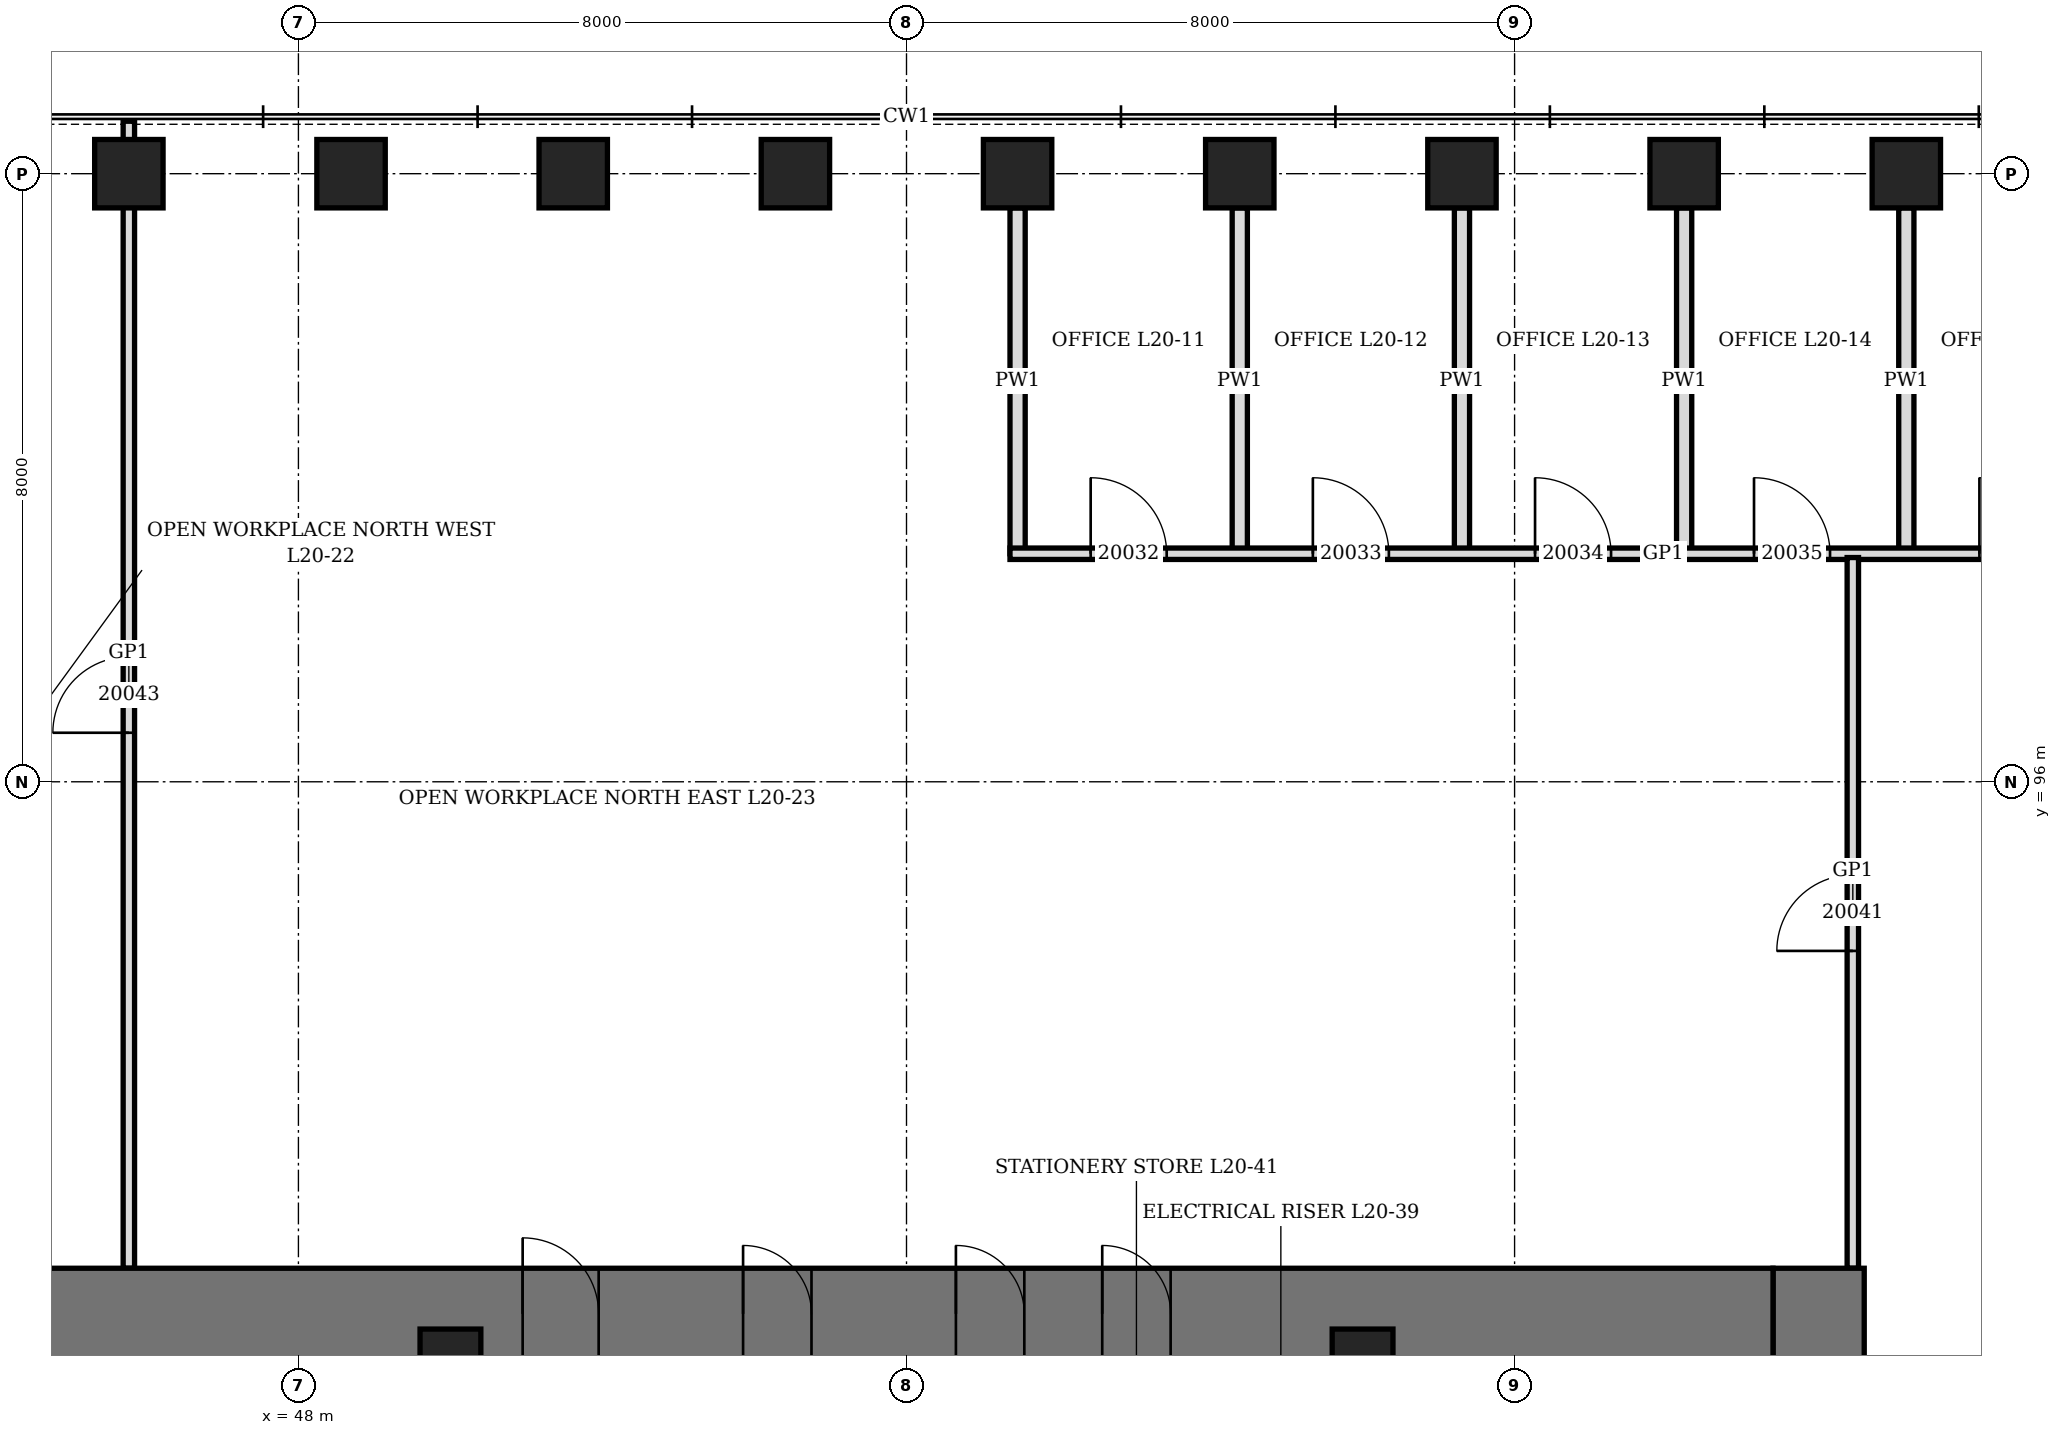
"""IFC4 building model, lengths in metres.
Left out: names, types, materials, properties, quantities, classifications, styles, units other than length and angle.
Written with IfcOpenShell. Run it as: python <this file> out.ifc"""

import sys

from ifc_helpers import new_model, si_unit, direction, frame, frame_2d, origin, origin_2d, place, context, subcontext, project, spatial, rectangle, hollow_rectangle, extrude, element, fill, save


model = new_model("IFC4")
c1 = context("Model", 3, precision=1e-05, world=origin(), true_north=direction((0.0, 1.0)))
c2 = subcontext(c1, "Body", "Model", "MODEL_VIEW")
j1 = project(units=[si_unit("LENGTHUNIT", "METRE"), si_unit("PLANEANGLEUNIT", "RADIAN")], contexts=[c1])
p1 = place(None, origin())
s1 = spatial("IfcSite", under=j1, at=p1, CompositionType="ELEMENT")
p2 = place(p1, origin())
s2 = spatial("IfcBuilding", under=s1, at=p2, CompositionType="ELEMENT")
p3 = place(p2, frame((0.0, 0.0, 93.7)))
s3 = spatial("IfcBuildingStorey", under=s2, at=p3, CompositionType="ELEMENT", Elevation=93.7)
for number, where, z_axis, x_axis in (
    (1, (69.154, 104.0, 0.0), (0.0, 0.0, 1.0), (1.0, 0.0, 0.0)),
    (2, (66.231, 104.0, 0.0), (0.0, 0.0, 1.0), (1.0, 0.0, 0.0)),
    (3, (63.308, 104.0, 0.0), (0.0, 0.0, 1.0), (1.0, 0.0, 0.0)),
    (4, (60.385, 104.0, 0.0), (0.0, 0.0, 1.0), (1.0, 0.0, 0.0)),
    (5, (57.461, 104.0, 0.0), (0.0, 0.0, 1.0), (1.0, 0.0, 0.0)),
    (6, (54.539, 104.0, 0.0), (0.0, 0.0, 1.0), (1.0, 0.0, 0.0)),
    (7, (51.615, 104.0, 0.0), (0.0, 0.0, 1.0), (1.0, 0.0, 0.0)),
    (8, (48.692, 104.0, 0.0), (0.0, 0.0, 1.0), (1.0, 0.0, 0.0)),
    (9, (45.769, 104.0, 0.0), (0.0, 0.0, 1.0), (1.0, 0.0, 0.0)),
):
    element("IfcColumn", number, at=place(p3, frame(where, z_axis=z_axis, x_axis=x_axis)), inside=s3, PredefinedType="COLUMN", context=c2, shape_type="SweptSolid", body=[
        extrude(hollow_rectangle(XDim=0.9, YDim=0.9, WallThickness=0.12, at=origin_2d()), origin(), (0.0, 0.0, 1.0), 4.2),
    ])
p4 = place(p3, frame((68.0, 70.4, 0.0), z_axis=(0.0, 0.0, 1.0), x_axis=(0.0, 1.0, 0.0)))
e10 = element("IfcWall", 10, at=p4, inside=s3, PredefinedType="SHEAR", context=c2, shape_type="SweptSolid", body=[
    extrude(rectangle(XDim=19.2, YDim=1.2, at=frame_2d((9.6, 0.0))), origin(), (0.0, 0.0, 1.0), 4.2),
])
p5 = place(p4, frame((8.6, 0.0, 0.0)))
e11 = element("IfcOpeningElement", 11, at=p5, cuts=e10, PredefinedType="OPENING", context=c2, shape_type="SweptSolid", body=[
    extrude(rectangle(XDim=2.0, YDim=2.4, at=frame_2d((1.0, 1.2))), frame((0.0, 0.61, 0.0), z_axis=(0.0, -1.0, 0.0), x_axis=(1.0, 0.0, 0.0)), (0.0, 0.0, 1.0), 1.22),
])
p6 = place(p3, frame((44.6, 89.0, 0.0), z_axis=(0.0, 0.0, 1.0), x_axis=(1.0, 0.0, 0.0)))
e12 = element("IfcWall", 12, at=p6, inside=s3, PredefinedType="SHEAR", context=c2, shape_type="SweptSolid", body=[
    extrude(rectangle(XDim=22.8, YDim=1.2, at=frame_2d((11.4, 0.0))), origin(), (0.0, 0.0, 1.0), 4.2),
])
p7 = place(p6, frame((6.35, 0.0, 0.0)))
e13 = element("IfcOpeningElement", 13, at=p7, cuts=e12, PredefinedType="OPENING", context=c2, shape_type="SweptSolid", body=[
    extrude(rectangle(XDim=1.0, YDim=2.1, at=frame_2d((0.5, 1.05))), frame((0.0, 0.61, 0.0), z_axis=(0.0, -1.0, 0.0), x_axis=(1.0, 0.0, 0.0)), (0.0, 0.0, 1.0), 1.22),
])
p8 = place(p6, frame((9.25, 0.0, 0.0)))
e14 = element("IfcOpeningElement", 14, at=p8, cuts=e12, PredefinedType="OPENING", context=c2, shape_type="SweptSolid", body=[
    extrude(rectangle(XDim=0.9, YDim=2.1, at=frame_2d((0.45, 1.05))), frame((0.0, 0.61, 0.0), z_axis=(0.0, -1.0, 0.0), x_axis=(1.0, 0.0, 0.0)), (0.0, 0.0, 1.0), 1.22),
])
p9 = place(p6, frame((12.05, 0.0, 0.0)))
e15 = element("IfcOpeningElement", 15, at=p9, cuts=e12, PredefinedType="OPENING", context=c2, shape_type="SweptSolid", body=[
    extrude(rectangle(XDim=0.9, YDim=2.1, at=frame_2d((0.45, 1.05))), frame((0.0, 0.61, 0.0), z_axis=(0.0, -1.0, 0.0), x_axis=(1.0, 0.0, 0.0)), (0.0, 0.0, 1.0), 1.22),
])
p10 = place(p6, frame((13.975, 0.0, 0.0)))
e16 = element("IfcOpeningElement", 16, at=p10, cuts=e12, PredefinedType="OPENING", context=c2, shape_type="SweptSolid", body=[
    extrude(rectangle(XDim=0.9, YDim=2.1, at=frame_2d((0.45, 1.05))), frame((0.0, 0.61, 0.0), z_axis=(0.0, -1.0, 0.0), x_axis=(1.0, 0.0, 0.0)), (0.0, 0.0, 1.0), 1.22),
])
for number, where, z_axis, x_axis in (
    (17, (50.0, 88.4, 0.0), (0.0, 0.0, 1.0), (1.0, 0.0, 0.0)),
    (18, (62.0, 88.4, 0.0), (0.0, 0.0, 1.0), (1.0, 0.0, 0.0)),
):
    element("IfcColumn", number, at=place(p3, frame(where, z_axis=z_axis, x_axis=x_axis)), inside=s3, PredefinedType="COLUMN", context=c2, shape_type="SweptSolid", body=[
        extrude(hollow_rectangle(XDim=0.8, YDim=0.8, WallThickness=0.1, at=origin_2d()), origin(), (0.0, 0.0, 1.0), 4.2),
    ])
for number, where, z_axis, x_axis in (
    (19, (57.461, 99.0, 0.0), (0.0, 0.0, 1.0), (0.0, 1.0, 0.0)),
    (20, (60.385, 99.0, 0.0), (0.0, 0.0, 1.0), (0.0, 1.0, 0.0)),
    (21, (63.308, 99.0, 0.0), (0.0, 0.0, 1.0), (0.0, 1.0, 0.0)),
    (22, (66.231, 99.0, 0.0), (0.0, 0.0, 1.0), (0.0, 1.0, 0.0)),
    (23, (69.154, 99.0, 0.0), (0.0, 0.0, 1.0), (0.0, 1.0, 0.0)),
):
    element("IfcWall", number, at=place(p3, frame(where, z_axis=z_axis, x_axis=x_axis)), inside=s3, PredefinedType="PARTITIONING", context=c2, shape_type="SweptSolid", body=[
        extrude(rectangle(XDim=4.55, YDim=0.2, at=frame_2d((2.275, 0.0))), origin(), (0.0, 0.0, 1.0), 3.278),
    ])
p11 = place(p3, frame((57.362, 99.0, 0.0), z_axis=(0.0, 0.0, 1.0), x_axis=(1.0, 0.0, 0.0)))
e24 = element("IfcWall", 24, at=p11, inside=s3, PredefinedType="PARTITIONING", context=c2, shape_type="SweptSolid", body=[
    extrude(rectangle(XDim=17.188, YDim=0.15, at=frame_2d((8.594, 0.0))), origin(), (0.0, 0.0, 1.0), 4.04),
])
p12 = place(p11, frame((1.062, 0.0, 0.0)))
e25 = element("IfcOpeningElement", 25, at=p12, cuts=e24, PredefinedType="OPENING", context=c2, shape_type="SweptSolid", body=[
    extrude(rectangle(XDim=1.0, YDim=2.1, at=frame_2d((0.5, 1.05))), frame((0.0, 0.085, 0.0), z_axis=(0.0, -1.0, 0.0), x_axis=(1.0, 0.0, 0.0)), (0.0, 0.0, 1.0), 0.17),
])
p13 = place(p11, frame((3.985, 0.0, 0.0)))
e26 = element("IfcOpeningElement", 26, at=p13, cuts=e24, PredefinedType="OPENING", context=c2, shape_type="SweptSolid", body=[
    extrude(rectangle(XDim=1.0, YDim=2.1, at=frame_2d((0.5, 1.05))), frame((0.0, 0.085, 0.0), z_axis=(0.0, -1.0, 0.0), x_axis=(1.0, 0.0, 0.0)), (0.0, 0.0, 1.0), 0.17),
])
p14 = place(p11, frame((6.908, 0.0, 0.0)))
e27 = element("IfcOpeningElement", 27, at=p14, cuts=e24, PredefinedType="OPENING", context=c2, shape_type="SweptSolid", body=[
    extrude(rectangle(XDim=1.0, YDim=2.1, at=frame_2d((0.5, 1.05))), frame((0.0, 0.085, 0.0), z_axis=(0.0, -1.0, 0.0), x_axis=(1.0, 0.0, 0.0)), (0.0, 0.0, 1.0), 0.17),
])
p15 = place(p11, frame((9.789, 0.0, 0.0)))
e28 = element("IfcOpeningElement", 28, at=p15, cuts=e24, PredefinedType="OPENING", context=c2, shape_type="SweptSolid", body=[
    extrude(rectangle(XDim=1.0, YDim=2.1, at=frame_2d((0.5, 1.05))), frame((0.0, 0.085, 0.0), z_axis=(0.0, -1.0, 0.0), x_axis=(1.0, 0.0, 0.0)), (0.0, 0.0, 1.0), 0.17),
])
p16 = place(p11, frame((12.754, 0.0, 0.0)))
e29 = element("IfcOpeningElement", 29, at=p16, cuts=e24, PredefinedType="OPENING", context=c2, shape_type="SweptSolid", body=[
    extrude(rectangle(XDim=1.0, YDim=2.1, at=frame_2d((0.5, 1.05))), frame((0.0, 0.085, 0.0), z_axis=(0.0, -1.0, 0.0), x_axis=(1.0, 0.0, 0.0)), (0.0, 0.0, 1.0), 0.17),
])
p17 = place(p11, frame((15.677, 0.0, 0.0)))
e30 = element("IfcOpeningElement", 30, at=p17, cuts=e24, PredefinedType="OPENING", context=c2, shape_type="SweptSolid", body=[
    extrude(rectangle(XDim=1.0, YDim=2.4, at=frame_2d((0.5, 1.2))), frame((0.0, 0.085, 0.0), z_axis=(0.0, -1.0, 0.0), x_axis=(1.0, 0.0, 0.0)), (0.0, 0.0, 1.0), 0.17),
])
p18 = place(p3, frame((45.769, 89.6, 0.0), z_axis=(0.0, 0.0, 1.0), x_axis=(0.0, 1.0, 0.0)))
e31 = element("IfcWall", 31, at=p18, inside=s3, PredefinedType="PARTITIONING", context=c2, shape_type="SweptSolid", body=[
    extrude(rectangle(XDim=15.09, YDim=0.15, at=frame_2d((7.545, 0.0))), origin(), (0.0, 0.0, 1.0), 3.278),
])
p19 = place(p18, frame((7.045, 0.0, 0.0)))
e32 = element("IfcOpeningElement", 32, at=p19, cuts=e31, PredefinedType="OPENING", context=c2, shape_type="SweptSolid", body=[
    extrude(rectangle(XDim=1.0, YDim=2.4, at=frame_2d((0.5, 1.2))), frame((0.0, 0.085, 0.0), z_axis=(0.0, -1.0, 0.0), x_axis=(1.0, 0.0, 0.0)), (0.0, 0.0, 1.0), 0.17),
])
p20 = place(p3, frame((68.45, 89.6, 0.0), z_axis=(0.0, 0.0, 1.0), x_axis=(0.0, 1.0, 0.0)))
e33 = element("IfcWall", 33, at=p20, inside=s3, PredefinedType="PARTITIONING", context=c2, shape_type="SweptSolid", body=[
    extrude(rectangle(XDim=9.35, YDim=0.15, at=frame_2d((4.675, 0.0))), origin(), (0.0, 0.0, 1.0), 4.04),
])
p21 = place(p20, frame((4.175, 0.0, 0.0)))
e34 = element("IfcOpeningElement", 34, at=p21, cuts=e33, PredefinedType="OPENING", context=c2, shape_type="SweptSolid", body=[
    extrude(rectangle(XDim=1.0, YDim=2.4, at=frame_2d((0.5, 1.2))), frame((0.0, 0.085, 0.0), z_axis=(0.0, -1.0, 0.0), x_axis=(1.0, 0.0, 0.0)), (0.0, 0.0, 1.0), 0.17),
])
p22 = place(p7, origin())
e35 = element("IfcDoor", 35, at=p22, inside=s3, OperationType="SINGLE_SWING_LEFT", PredefinedType="DOOR", context=c2, shape_type="SweptSolid", body=[
    extrude(rectangle(XDim=1.0, YDim=2.1, at=frame_2d((0.5, 1.05))), frame((0.0, 0.35, 0.0), z_axis=(0.0, -1.0, 0.0), x_axis=(1.0, 0.0, 0.0)), (0.0, 0.0, 1.0), 0.7),
])
fill(e13, e35)
p23 = place(p8, origin())
e36 = element("IfcDoor", 36, at=p23, inside=s3, OperationType="SINGLE_SWING_LEFT", PredefinedType="DOOR", context=c2, shape_type="SweptSolid", body=[
    extrude(rectangle(XDim=0.9, YDim=2.1, at=frame_2d((0.45, 1.05))), frame((0.0, 0.35, 0.0), z_axis=(0.0, -1.0, 0.0), x_axis=(1.0, 0.0, 0.0)), (0.0, 0.0, 1.0), 0.7),
])
fill(e14, e36)
p24 = place(p9, origin())
e37 = element("IfcDoor", 37, at=p24, inside=s3, OperationType="SINGLE_SWING_LEFT", PredefinedType="DOOR", context=c2, shape_type="SweptSolid", body=[
    extrude(rectangle(XDim=0.9, YDim=2.1, at=frame_2d((0.45, 1.05))), frame((0.0, 0.35, 0.0), z_axis=(0.0, -1.0, 0.0), x_axis=(1.0, 0.0, 0.0)), (0.0, 0.0, 1.0), 0.7),
])
fill(e15, e37)
p25 = place(p10, origin())
e38 = element("IfcDoor", 38, at=p25, inside=s3, OperationType="SINGLE_SWING_LEFT", PredefinedType="DOOR", context=c2, shape_type="SweptSolid", body=[
    extrude(rectangle(XDim=0.9, YDim=2.1, at=frame_2d((0.45, 1.05))), frame((0.0, 0.35, 0.0), z_axis=(0.0, -1.0, 0.0), x_axis=(1.0, 0.0, 0.0)), (0.0, 0.0, 1.0), 0.7),
])
fill(e16, e38)
p26 = place(p12, origin())
e39 = element("IfcDoor", 39, at=p26, inside=s3, OperationType="SINGLE_SWING_LEFT", PredefinedType="DOOR", context=c2, shape_type="SweptSolid", body=[
    extrude(rectangle(XDim=1.0, YDim=2.1, at=frame_2d((0.5, 1.05))), frame((0.0, 0.075, 0.0), z_axis=(0.0, -1.0, 0.0), x_axis=(1.0, 0.0, 0.0)), (0.0, 0.0, 1.0), 0.149),
])
fill(e25, e39)
p27 = place(p13, origin())
e40 = element("IfcDoor", 40, at=p27, inside=s3, OperationType="SINGLE_SWING_LEFT", PredefinedType="DOOR", context=c2, shape_type="SweptSolid", body=[
    extrude(rectangle(XDim=1.0, YDim=2.1, at=frame_2d((0.5, 1.05))), frame((0.0, 0.075, 0.0), z_axis=(0.0, -1.0, 0.0), x_axis=(1.0, 0.0, 0.0)), (0.0, 0.0, 1.0), 0.149),
])
fill(e26, e40)
p28 = place(p14, origin())
e41 = element("IfcDoor", 41, at=p28, inside=s3, OperationType="SINGLE_SWING_LEFT", PredefinedType="DOOR", context=c2, shape_type="SweptSolid", body=[
    extrude(rectangle(XDim=1.0, YDim=2.1, at=frame_2d((0.5, 1.05))), frame((0.0, 0.075, 0.0), z_axis=(0.0, -1.0, 0.0), x_axis=(1.0, 0.0, 0.0)), (0.0, 0.0, 1.0), 0.149),
])
fill(e27, e41)
p29 = place(p15, origin())
e42 = element("IfcDoor", 42, at=p29, inside=s3, OperationType="SINGLE_SWING_LEFT", PredefinedType="DOOR", context=c2, shape_type="SweptSolid", body=[
    extrude(rectangle(XDim=1.0, YDim=2.1, at=frame_2d((0.5, 1.05))), frame((0.0, 0.075, 0.0), z_axis=(0.0, -1.0, 0.0), x_axis=(1.0, 0.0, 0.0)), (0.0, 0.0, 1.0), 0.149),
])
fill(e28, e42)
p30 = place(p16, origin())
e43 = element("IfcDoor", 43, at=p30, inside=s3, OperationType="SINGLE_SWING_LEFT", PredefinedType="DOOR", context=c2, shape_type="SweptSolid", body=[
    extrude(rectangle(XDim=1.0, YDim=2.1, at=frame_2d((0.5, 1.05))), frame((0.0, 0.075, 0.0), z_axis=(0.0, -1.0, 0.0), x_axis=(1.0, 0.0, 0.0)), (0.0, 0.0, 1.0), 0.149),
])
fill(e29, e43)
p31 = place(p21, origin())
e44 = element("IfcDoor", 44, at=p31, inside=s3, OperationType="SINGLE_SWING_RIGHT", PredefinedType="DOOR", context=c2, shape_type="SweptSolid", body=[
    extrude(rectangle(XDim=1.0, YDim=2.4, at=frame_2d((0.5, 1.2))), frame((0.0, 0.075, 0.0), z_axis=(0.0, -1.0, 0.0), x_axis=(1.0, 0.0, 0.0)), (0.0, 0.0, 1.0), 0.149),
])
fill(e34, e44)
p32 = place(p19, origin())
e45 = element("IfcDoor", 45, at=p32, inside=s3, OperationType="SINGLE_SWING_RIGHT", PredefinedType="DOOR", context=c2, shape_type="SweptSolid", body=[
    extrude(rectangle(XDim=1.0, YDim=2.4, at=frame_2d((0.5, 1.2))), frame((0.0, 0.075, 0.0), z_axis=(0.0, -1.0, 0.0), x_axis=(1.0, 0.0, 0.0)), (0.0, 0.0, 1.0), 0.149),
])
fill(e32, e45)
save(model, sys.argv[1])
